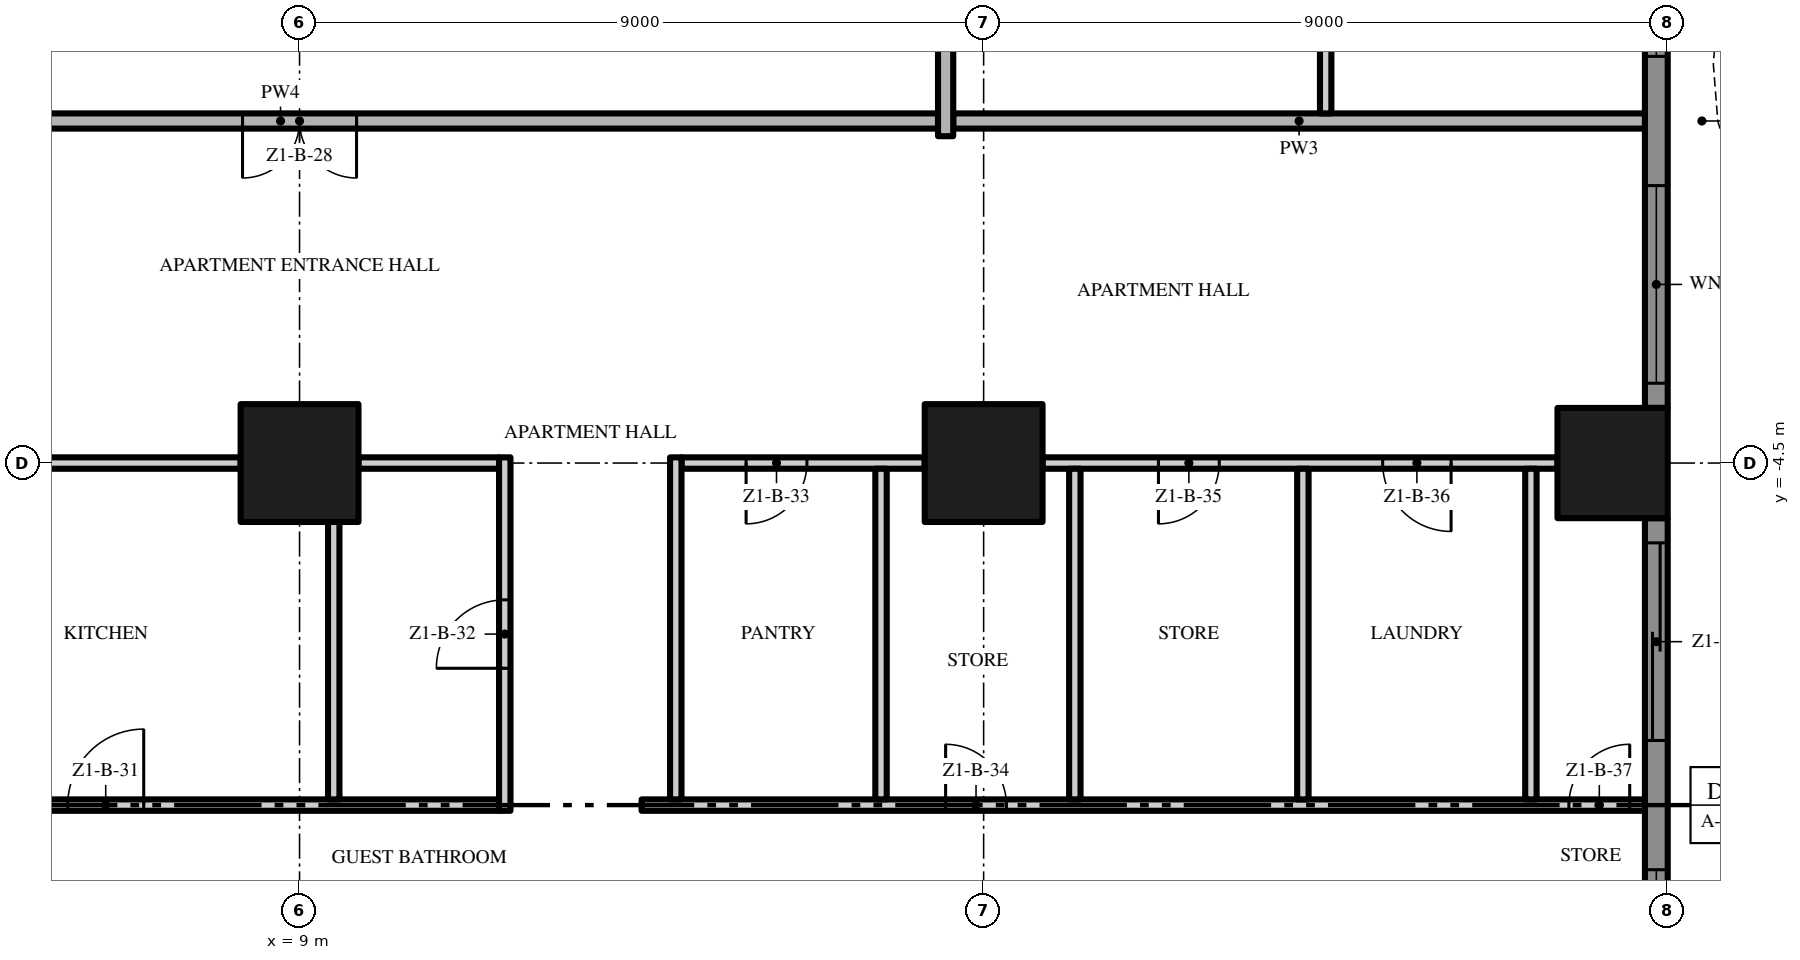
"""IFC4 building model, lengths in metres.
Left out: names, types, materials, properties, quantities, classifications, styles, units other than length and angle.
Written with IfcOpenShell. Run it as: python <this file> out.ifc"""

import sys

from ifc_helpers import new_model, si_unit, direction, frame, frame_2d, origin, origin_2d, place, context, subcontext, project, spatial, polyline, rectangle, outline, extrude, element, fill, save


model = new_model("IFC4")
c1 = context("Model", 3, precision=1e-05, world=origin(), true_north=direction((0.0, 1.0)))
c2 = subcontext(c1, "Body", "Model", "MODEL_VIEW")
j1 = project(units=[si_unit("LENGTHUNIT", "METRE"), si_unit("PLANEANGLEUNIT", "RADIAN")], contexts=[c1])
p1 = place(None, origin())
s1 = spatial("IfcSite", under=j1, at=p1, CompositionType="ELEMENT")
p2 = place(p1, origin())
s2 = spatial("IfcBuilding", under=s1, at=p2, CompositionType="ELEMENT")
p3 = place(p2, frame((0.0, 0.0, 30.2)))
s3 = spatial("IfcBuildingStorey", under=s2, at=p3, CompositionType="ELEMENT", Elevation=30.2)
p4 = place(p3, frame((18.0, -4.5, 0.0), z_axis=(0.0, 0.0, 1.0), x_axis=(1.0, 0.0, 0.0)))
e1 = element("IfcColumn", 1, at=p4, inside=s3, PredefinedType="COLUMN", context=c2, shape_type="SweptSolid", body=[
    extrude(rectangle(XDim=1.55, YDim=1.55, at=origin_2d()), origin(), (0.0, 0.0, 1.0), 3.5),
])
p5 = place(p3, frame((26.275, -4.5, 0.0), z_axis=(0.0, 0.0, 1.0), x_axis=(1.0, 0.0, 0.0)))
e2 = element("IfcColumn", 2, at=p5, inside=s3, PredefinedType="COLUMN", context=c2, shape_type="SweptSolid", body=[
    extrude(rectangle(XDim=1.45, YDim=1.45, at=origin_2d()), origin(), (0.0, 0.0, 1.0), 3.5),
])
p6 = place(p3, frame((9.0, -4.5, 0.0), z_axis=(0.0, 0.0, 1.0), x_axis=(1.0, 0.0, 0.0)))
e3 = element("IfcColumn", 3, at=p6, inside=s3, PredefinedType="COLUMN", context=c2, shape_type="SweptSolid", body=[
    extrude(rectangle(XDim=1.55, YDim=1.55, at=origin_2d()), origin(), (0.0, 0.0, 1.0), 3.5),
])
p7 = place(p3, frame((26.85, -5.225, 0.0), z_axis=(0.0, 0.0, 1.0), x_axis=(0.0, -1.0, 0.0)))
e4 = element("IfcWall", 4, at=p7, inside=s3, PredefinedType="SOLIDWALL", context=c2, shape_type="SweptSolid", body=[
    extrude(rectangle(XDim=7.55, YDim=0.3, at=frame_2d((3.775, 0.0))), origin(), (0.0, 0.0, 1.0), 3.5),
])
p8 = place(p7, frame((4.625, 0.0, 0.45)))
e5 = element("IfcOpeningElement", 5, at=p8, cuts=e4, PredefinedType="OPENING", context=c2, shape_type="SweptSolid", body=[
    extrude(rectangle(XDim=2.6, YDim=2.65, at=frame_2d((1.3, 1.325))), frame((0.0, 0.16, 0.0), z_axis=(0.0, -1.0, 0.0), x_axis=(1.0, 0.0, 0.0)), (0.0, 0.0, 1.0), 0.32),
])
p9 = place(p7, frame((0.325, 0.0, 0.0)))
e6 = element("IfcOpeningElement", 6, at=p9, cuts=e4, PredefinedType="OPENING", context=c2, shape_type="SweptSolid", body=[
    extrude(rectangle(XDim=2.6, YDim=2.4, at=frame_2d((1.3, 1.2))), frame((0.0, 0.16, 0.0), z_axis=(0.0, -1.0, 0.0), x_axis=(1.0, 0.0, 0.0)), (0.0, 0.0, 1.0), 0.32),
])
p10 = place(p3, frame((26.85, 3.775, 0.0), z_axis=(0.0, 0.0, 1.0), x_axis=(0.0, -1.0, 0.0)))
e7 = element("IfcWall", 7, at=p10, inside=s3, PredefinedType="SOLIDWALL", context=c2, shape_type="SweptSolid", body=[
    extrude(rectangle(XDim=7.55, YDim=0.3, at=frame_2d((3.775, 0.0))), origin(), (0.0, 0.0, 1.0), 3.5),
])
p11 = place(p10, frame((4.625, 0.0, 0.45)))
e8 = element("IfcOpeningElement", 8, at=p11, cuts=e7, PredefinedType="OPENING", context=c2, shape_type="SweptSolid", body=[
    extrude(rectangle(XDim=2.6, YDim=2.65, at=frame_2d((1.3, 1.325))), frame((0.0, 0.16, 0.0), z_axis=(0.0, -1.0, 0.0), x_axis=(1.0, 0.0, 0.0)), (0.0, 0.0, 1.0), 0.32),
])
p12 = place(p10, frame((0.325, 0.0, 0.45)))
e9 = element("IfcOpeningElement", 9, at=p12, cuts=e7, PredefinedType="OPENING", context=c2, shape_type="SweptSolid", body=[
    extrude(rectangle(XDim=2.6, YDim=2.65, at=frame_2d((1.3, 1.325))), frame((0.0, 0.16, 0.0), z_axis=(0.0, -1.0, 0.0), x_axis=(1.0, 0.0, 0.0)), (0.0, 0.0, 1.0), 0.32),
])
p13 = place(p3, origin())
e10 = element("IfcWall", 10, at=p13, inside=s3, PredefinedType="USERDEFINED", context=c2, shape_type="SweptSolid", body=[
    extrude(outline(polyline([(28.8, -18.0), (28.095, -16.5), (27.659, -15.0), (27.6, -14.25), (27.659, -13.5), (28.095, -12.0), (28.8, -10.5), (29.505, -9.0), (29.941, -7.5), (30.0, -6.75), (29.941, -6.0), (29.505, -4.5), (28.8, -3.0), (28.095, -1.5), (27.659, 0.0), (27.6, 0.75), (27.659, 1.5), (28.095, 3.0), (28.8, 4.5), (29.505, 6.0), (29.941, 7.5), (30.0, 8.25), (29.941, 9.0), (29.505, 10.5), (28.8, 12.0), (28.095, 13.5), (27.659, 15.0), (27.6, 15.75), (27.659, 16.5), (28.095, 18.0), (27.855, 18.07), (27.411, 16.545), (27.349, 15.75), (27.411, 14.955), (27.86, 13.411), (28.574, 11.894), (29.271, 10.411), (29.694, 8.955), (29.749, 8.25), (29.694, 7.545), (29.271, 6.089), (28.574, 4.606), (27.86, 3.089), (27.411, 1.545), (27.349, 0.75), (27.411, -0.045), (27.86, -1.589), (28.574, -3.106), (29.271, -4.589), (29.694, -6.045), (29.749, -6.75), (29.694, -7.455), (29.271, -8.911), (28.574, -10.394), (27.86, -11.911), (27.411, -13.455), (27.349, -14.25), (27.411, -15.045), (27.86, -16.589), (28.574, -18.106), (28.8, -18.0)])), origin(), (0.0, 0.0, 1.0), 0.9),
])
p14 = place(p3, frame((0.1, -9.0, 0.0), z_axis=(0.0, 0.0, 1.0), x_axis=(1.0, 0.0, 0.0)))
e11 = element("IfcWall", 11, at=p14, inside=s3, PredefinedType="PARTITIONING", context=c2, shape_type="SweptSolid", body=[
    extrude(rectangle(XDim=11.525, YDim=0.15, at=frame_2d((5.763, 0.0))), origin(), (0.0, 0.0, 1.0), 3.5),
])
p15 = place(p14, frame((0.4, 0.0, 0.0)))
e12 = element("IfcOpeningElement", 12, at=p15, cuts=e11, PredefinedType="OPENING", context=c2, shape_type="SweptSolid", body=[
    extrude(rectangle(XDim=0.8, YDim=2.0, at=frame_2d((0.4, 1.0))), frame((0.0, 0.085, 0.0), z_axis=(0.0, -1.0, 0.0), x_axis=(1.0, 0.0, 0.0)), (0.0, 0.0, 1.0), 0.17),
])
p16 = place(p14, frame((5.85, 0.0, 0.0)))
e13 = element("IfcOpeningElement", 13, at=p16, cuts=e11, PredefinedType="OPENING", context=c2, shape_type="SweptSolid", body=[
    extrude(rectangle(XDim=1.0, YDim=2.4, at=frame_2d((0.5, 1.2))), frame((0.0, 0.085, 0.0), z_axis=(0.0, -1.0, 0.0), x_axis=(1.0, 0.0, 0.0)), (0.0, 0.0, 1.0), 0.17),
])
p17 = place(p3, frame((13.5, -9.0, 0.0), z_axis=(0.0, 0.0, 1.0), x_axis=(1.0, 0.0, 0.0)))
e14 = element("IfcWall", 14, at=p17, inside=s3, PredefinedType="PARTITIONING", context=c2, shape_type="SweptSolid", body=[
    extrude(rectangle(XDim=13.2, YDim=0.15, at=frame_2d((6.6, 0.0))), origin(), (0.0, 0.0, 1.0), 3.5),
])
p18 = place(p17, frame((4.0, 0.0, 0.0)))
e15 = element("IfcOpeningElement", 15, at=p18, cuts=e14, PredefinedType="OPENING", context=c2, shape_type="SweptSolid", body=[
    extrude(rectangle(XDim=0.8, YDim=2.0, at=frame_2d((0.4, 1.0))), frame((0.0, 0.085, 0.0), z_axis=(0.0, -1.0, 0.0), x_axis=(1.0, 0.0, 0.0)), (0.0, 0.0, 1.0), 0.17),
])
p19 = place(p17, frame((12.2, 0.0, 0.0)))
e16 = element("IfcOpeningElement", 16, at=p19, cuts=e14, PredefinedType="OPENING", context=c2, shape_type="SweptSolid", body=[
    extrude(rectangle(XDim=0.8, YDim=2.0, at=frame_2d((0.4, 1.0))), frame((0.0, 0.085, 0.0), z_axis=(0.0, -1.0, 0.0), x_axis=(1.0, 0.0, 0.0)), (0.0, 0.0, 1.0), 0.17),
])
p20 = place(p3, frame((8.225, -4.5, 0.0), z_axis=(0.0, 0.0, 1.0), x_axis=(-1.0, 0.0, 0.0)))
e17 = element("IfcWall", 17, at=p20, inside=s3, PredefinedType="PARTITIONING", context=c2, shape_type="SweptSolid", body=[
    extrude(rectangle(XDim=7.45, YDim=0.15, at=frame_2d((3.725, 0.0))), origin(), (0.0, 0.0, 1.0), 3.5),
])
p21 = place(p20, frame((5.225, 0.0, 0.0)))
e18 = element("IfcOpeningElement", 18, at=p21, cuts=e17, PredefinedType="OPENING", context=c2, shape_type="SweptSolid", body=[
    extrude(rectangle(XDim=0.8, YDim=2.0, at=frame_2d((0.4, 1.0))), frame((0.0, 0.085, 0.0), z_axis=(0.0, -1.0, 0.0), x_axis=(1.0, 0.0, 0.0)), (0.0, 0.0, 1.0), 0.17),
])
p22 = place(p3, frame((9.775, -4.5, 0.0), z_axis=(0.0, 0.0, 1.0), x_axis=(1.0, 0.0, 0.0)))
e19 = element("IfcWall", 19, at=p22, inside=s3, PredefinedType="PARTITIONING", context=c2, shape_type="SweptSolid", body=[
    extrude(rectangle(XDim=1.85, YDim=0.15, at=frame_2d((0.925, 0.0))), origin(), (0.0, 0.0, 1.0), 3.5),
])
p23 = place(p3, frame((17.225, -4.5, 0.0), z_axis=(0.0, 0.0, 1.0), x_axis=(-1.0, 0.0, 0.0)))
e20 = element("IfcWall", 20, at=p23, inside=s3, PredefinedType="PARTITIONING", context=c2, shape_type="SweptSolid", body=[
    extrude(rectangle(XDim=3.2, YDim=0.15, at=frame_2d((1.6, 0.0))), origin(), (0.0, 0.0, 1.0), 3.5),
])
p24 = place(p23, frame((1.55, 0.0, 0.0)))
e21 = element("IfcOpeningElement", 21, at=p24, cuts=e20, PredefinedType="OPENING", context=c2, shape_type="SweptSolid", body=[
    extrude(rectangle(XDim=0.8, YDim=2.0, at=frame_2d((0.4, 1.0))), frame((0.0, 0.085, 0.0), z_axis=(0.0, -1.0, 0.0), x_axis=(1.0, 0.0, 0.0)), (0.0, 0.0, 1.0), 0.17),
])
p25 = place(p3, frame((25.55, -4.5, 0.0), z_axis=(0.0, 0.0, 1.0), x_axis=(-1.0, 0.0, 0.0)))
e22 = element("IfcWall", 22, at=p25, inside=s3, PredefinedType="PARTITIONING", context=c2, shape_type="SweptSolid", body=[
    extrude(rectangle(XDim=6.775, YDim=0.15, at=frame_2d((3.388, 0.0))), origin(), (0.0, 0.0, 1.0), 3.5),
])
p26 = place(p25, frame((4.45, 0.0, 0.0)))
e23 = element("IfcOpeningElement", 23, at=p26, cuts=e22, PredefinedType="OPENING", context=c2, shape_type="SweptSolid", body=[
    extrude(rectangle(XDim=0.8, YDim=2.0, at=frame_2d((0.4, 1.0))), frame((0.0, 0.085, 0.0), z_axis=(0.0, -1.0, 0.0), x_axis=(1.0, 0.0, 0.0)), (0.0, 0.0, 1.0), 0.17),
])
p27 = place(p25, frame((1.4, 0.0, 0.0)))
e24 = element("IfcOpeningElement", 24, at=p27, cuts=e22, PredefinedType="OPENING", context=c2, shape_type="SweptSolid", body=[
    extrude(rectangle(XDim=0.9, YDim=2.1, at=frame_2d((0.45, 1.05))), frame((0.0, 0.085, 0.0), z_axis=(0.0, -1.0, 0.0), x_axis=(1.0, 0.0, 0.0)), (0.0, 0.0, 1.0), 0.17),
])
p28 = place(p3, frame((17.4, 0.0, 0.0), z_axis=(0.0, 0.0, 1.0), x_axis=(-1.0, 0.0, 0.0)))
e25 = element("IfcWall", 25, at=p28, inside=s3, PredefinedType="PARTITIONING", context=c2, shape_type="SweptSolid", body=[
    extrude(rectangle(XDim=17.3, YDim=0.2, at=frame_2d((8.65, 0.0))), origin(), (0.0, 0.0, 1.0), 3.5),
])
p29 = place(p28, frame((7.65, 0.0, 0.0)))
e26 = element("IfcOpeningElement", 26, at=p29, cuts=e25, PredefinedType="OPENING", context=c2, shape_type="SweptSolid", body=[
    extrude(rectangle(XDim=1.5, YDim=2.4, at=frame_2d((0.75, 1.2))), frame((0.0, 0.11, 0.0), z_axis=(0.0, -1.0, 0.0), x_axis=(1.0, 0.0, 0.0)), (0.0, 0.0, 1.0), 0.22),
])
p30 = place(p3, frame((17.6, 0.0, 0.0), z_axis=(0.0, 0.0, 1.0), x_axis=(1.0, 0.0, 0.0)))
e27 = element("IfcWall", 27, at=p30, inside=s3, PredefinedType="PARTITIONING", context=c2, shape_type="SweptSolid", body=[
    extrude(rectangle(XDim=9.1, YDim=0.2, at=frame_2d((4.55, 0.0))), origin(), (0.0, 0.0, 1.0), 3.5),
])
p31 = place(p3, frame((9.45, -8.925, 0.0), z_axis=(0.0, 0.0, 1.0), x_axis=(0.0, 1.0, 0.0)))
e28 = element("IfcWall", 28, at=p31, inside=s3, PredefinedType="PARTITIONING", context=c2, shape_type="SweptSolid", body=[
    extrude(rectangle(XDim=3.65, YDim=0.15, at=frame_2d((1.825, 0.0))), origin(), (0.0, 0.0, 1.0), 3.5),
])
p32 = place(p3, frame((11.7, -9.075, 0.0), z_axis=(0.0, 0.0, 1.0), x_axis=(0.0, 1.0, 0.0)))
e29 = element("IfcWall", 29, at=p32, inside=s3, PredefinedType="PARTITIONING", context=c2, shape_type="SweptSolid", body=[
    extrude(rectangle(XDim=4.65, YDim=0.15, at=frame_2d((2.325, 0.0))), origin(), (0.0, 0.0, 1.0), 3.5),
])
p33 = place(p32, frame((1.875, 0.0, 0.0)))
e30 = element("IfcOpeningElement", 30, at=p33, cuts=e29, PredefinedType="OPENING", context=c2, shape_type="SweptSolid", body=[
    extrude(rectangle(XDim=0.9, YDim=2.1, at=frame_2d((0.45, 1.05))), frame((0.0, 0.085, 0.0), z_axis=(0.0, -1.0, 0.0), x_axis=(1.0, 0.0, 0.0)), (0.0, 0.0, 1.0), 0.17),
])
p34 = place(p3, frame((13.95, -8.925, 0.0), z_axis=(0.0, 0.0, 1.0), x_axis=(0.0, 1.0, 0.0)))
e31 = element("IfcWall", 31, at=p34, inside=s3, PredefinedType="PARTITIONING", context=c2, shape_type="SweptSolid", body=[
    extrude(rectangle(XDim=4.5, YDim=0.15, at=frame_2d((2.25, 0.0))), origin(), (0.0, 0.0, 1.0), 3.5),
])
p35 = place(p3, frame((16.65, -8.925, 0.0), z_axis=(0.0, 0.0, 1.0), x_axis=(0.0, 1.0, 0.0)))
e32 = element("IfcWall", 32, at=p35, inside=s3, PredefinedType="PARTITIONING", context=c2, shape_type="SweptSolid", body=[
    extrude(rectangle(XDim=4.35, YDim=0.15, at=frame_2d((2.175, 0.0))), origin(), (0.0, 0.0, 1.0), 3.5),
])
p36 = place(p3, frame((17.5, -0.2, 0.0), z_axis=(0.0, 0.0, 1.0), x_axis=(0.0, 1.0, 0.0)))
e33 = element("IfcWall", 33, at=p36, inside=s3, PredefinedType="PARTITIONING", context=c2, shape_type="SweptSolid", body=[
    extrude(rectangle(XDim=3.925, YDim=0.2, at=frame_2d((1.962, 0.0))), origin(), (0.0, 0.0, 1.0), 3.5),
])
for number, where, z_axis, x_axis in (
    (34, (19.2, -8.925, 0.0), (0.0, 0.0, 1.0), (0.0, 1.0, 0.0)),
    (35, (22.2, -8.925, 0.0), (0.0, 0.0, 1.0), (0.0, 1.0, 0.0)),
):
    element("IfcWall", number, at=place(p3, frame(where, z_axis=z_axis, x_axis=x_axis)), inside=s3, PredefinedType="PARTITIONING", context=c2, shape_type="SweptSolid", body=[
        extrude(rectangle(XDim=4.35, YDim=0.15, at=frame_2d((2.175, 0.0))), origin(), (0.0, 0.0, 1.0), 3.5),
    ])
p37 = place(p3, frame((22.5, 17.275, 0.0), z_axis=(0.0, 0.0, 1.0), x_axis=(0.0, -1.0, 0.0)))
e36 = element("IfcWall", 36, at=p37, inside=s3, PredefinedType="PARTITIONING", context=c2, shape_type="SweptSolid", body=[
    extrude(rectangle(XDim=17.175, YDim=0.15, at=frame_2d((8.588, 0.0))), origin(), (0.0, 0.0, 1.0), 3.5),
])
p38 = place(p37, frame((14.525, 0.0, 0.0)))
e37 = element("IfcOpeningElement", 37, at=p38, cuts=e36, PredefinedType="OPENING", context=c2, shape_type="SweptSolid", body=[
    extrude(rectangle(XDim=1.0, YDim=2.4, at=frame_2d((0.5, 1.2))), frame((0.0, 0.085, 0.0), z_axis=(0.0, -1.0, 0.0), x_axis=(1.0, 0.0, 0.0)), (0.0, 0.0, 1.0), 0.17),
])
p39 = place(p37, frame((8.925, 0.0, 0.0)))
e38 = element("IfcOpeningElement", 38, at=p39, cuts=e36, PredefinedType="OPENING", context=c2, shape_type="SweptSolid", body=[
    extrude(rectangle(XDim=1.0, YDim=2.4, at=frame_2d((0.5, 1.2))), frame((0.0, 0.085, 0.0), z_axis=(0.0, -1.0, 0.0), x_axis=(1.0, 0.0, 0.0)), (0.0, 0.0, 1.0), 0.17),
])
p40 = place(p37, frame((3.975, 0.0, 0.0)))
e39 = element("IfcOpeningElement", 39, at=p40, cuts=e36, PredefinedType="OPENING", context=c2, shape_type="SweptSolid", body=[
    extrude(rectangle(XDim=1.8, YDim=2.4, at=frame_2d((0.9, 1.2))), frame((0.0, 0.085, 0.0), z_axis=(0.0, -1.0, 0.0), x_axis=(1.0, 0.0, 0.0)), (0.0, 0.0, 1.0), 0.17),
])
p41 = place(p3, frame((25.2, -8.925, 0.0), z_axis=(0.0, 0.0, 1.0), x_axis=(0.0, 1.0, 0.0)))
e40 = element("IfcWall", 40, at=p41, inside=s3, PredefinedType="PARTITIONING", context=c2, shape_type="SweptSolid", body=[
    extrude(rectangle(XDim=4.35, YDim=0.15, at=frame_2d((2.175, 0.0))), origin(), (0.0, 0.0, 1.0), 3.5),
])
p42 = place(p8, origin())
e41 = element("IfcWindow", 41, at=p42, inside=s3, PartitioningType="SINGLE_PANEL", PredefinedType="WINDOW", context=c2, shape_type="SweptSolid", body=[
    extrude(rectangle(XDim=2.6, YDim=2.65, at=frame_2d((1.3, 1.325))), frame((0.0, 0.03, 0.0), z_axis=(0.0, -1.0, 0.0), x_axis=(1.0, 0.0, 0.0)), (0.0, 0.0, 1.0), 0.06),
])
fill(e5, e41)
p43 = place(p9, origin())
e42 = element("IfcDoor", 42, at=p43, inside=s3, OperationType="SINGLE_SWING_LEFT", PredefinedType="DOOR", context=c2, shape_type="SweptSolid", body=[
    extrude(rectangle(XDim=2.6, YDim=2.4, at=frame_2d((1.3, 1.2))), frame((0.0, 0.025, 0.0), z_axis=(0.0, -1.0, 0.0), x_axis=(1.0, 0.0, 0.0)), (0.0, 0.0, 1.0), 0.05),
])
fill(e6, e42)
p44 = place(p11, origin())
e43 = element("IfcWindow", 43, at=p44, inside=s3, PartitioningType="SINGLE_PANEL", PredefinedType="WINDOW", context=c2, shape_type="SweptSolid", body=[
    extrude(rectangle(XDim=2.6, YDim=2.65, at=frame_2d((1.3, 1.325))), frame((0.0, 0.03, 0.0), z_axis=(0.0, -1.0, 0.0), x_axis=(1.0, 0.0, 0.0)), (0.0, 0.0, 1.0), 0.06),
])
fill(e8, e43)
p45 = place(p12, origin())
e44 = element("IfcWindow", 44, at=p45, inside=s3, PartitioningType="SINGLE_PANEL", PredefinedType="WINDOW", context=c2, shape_type="SweptSolid", body=[
    extrude(rectangle(XDim=2.6, YDim=2.65, at=frame_2d((1.3, 1.325))), frame((0.0, 0.03, 0.0), z_axis=(0.0, -1.0, 0.0), x_axis=(1.0, 0.0, 0.0)), (0.0, 0.0, 1.0), 0.06),
])
fill(e9, e44)
p46 = place(p29, origin())
e45 = element("IfcDoor", 45, at=p46, inside=s3, OperationType="DOUBLE_DOOR_SINGLE_SWING", PredefinedType="DOOR", context=c2, shape_type="SweptSolid", body=[
    extrude(rectangle(XDim=1.5, YDim=2.4, at=frame_2d((0.75, 1.2))), frame((0.0, 0.025, 0.0), z_axis=(0.0, -1.0, 0.0), x_axis=(1.0, 0.0, 0.0)), (0.0, 0.0, 1.0), 0.05),
])
fill(e26, e45)
p47 = place(p16, origin())
e46 = element("IfcDoor", 46, at=p47, inside=s3, OperationType="SINGLE_SWING_RIGHT", PredefinedType="DOOR", context=c2, shape_type="SweptSolid", body=[
    extrude(rectangle(XDim=1.0, YDim=2.4, at=frame_2d((0.5, 1.2))), frame((0.0, 0.025, 0.0), z_axis=(0.0, -1.0, 0.0), x_axis=(1.0, 0.0, 0.0)), (0.0, 0.0, 1.0), 0.05),
])
fill(e13, e46)
p48 = place(p33, origin())
e47 = element("IfcDoor", 47, at=p48, inside=s3, OperationType="SINGLE_SWING_LEFT", PredefinedType="DOOR", context=c2, shape_type="SweptSolid", body=[
    extrude(rectangle(XDim=0.9, YDim=2.1, at=frame_2d((0.45, 1.05))), frame((0.0, 0.025, 0.0), z_axis=(0.0, -1.0, 0.0), x_axis=(1.0, 0.0, 0.0)), (0.0, 0.0, 1.0), 0.05),
])
fill(e30, e47)
p49 = place(p24, origin())
e48 = element("IfcDoor", 48, at=p49, inside=s3, OperationType="SINGLE_SWING_RIGHT", PredefinedType="DOOR", context=c2, shape_type="SweptSolid", body=[
    extrude(rectangle(XDim=0.8, YDim=2.0, at=frame_2d((0.4, 1.0))), frame((0.0, 0.025, 0.0), z_axis=(0.0, -1.0, 0.0), x_axis=(1.0, 0.0, 0.0)), (0.0, 0.0, 1.0), 0.05),
])
fill(e21, e48)
p50 = place(p18, origin())
e49 = element("IfcDoor", 49, at=p50, inside=s3, OperationType="SINGLE_SWING_LEFT", PredefinedType="DOOR", context=c2, shape_type="SweptSolid", body=[
    extrude(rectangle(XDim=0.8, YDim=2.0, at=frame_2d((0.4, 1.0))), frame((0.0, 0.025, 0.0), z_axis=(0.0, -1.0, 0.0), x_axis=(1.0, 0.0, 0.0)), (0.0, 0.0, 1.0), 0.05),
])
fill(e15, e49)
p51 = place(p26, origin())
e50 = element("IfcDoor", 50, at=p51, inside=s3, OperationType="SINGLE_SWING_RIGHT", PredefinedType="DOOR", context=c2, shape_type="SweptSolid", body=[
    extrude(rectangle(XDim=0.8, YDim=2.0, at=frame_2d((0.4, 1.0))), frame((0.0, 0.025, 0.0), z_axis=(0.0, -1.0, 0.0), x_axis=(1.0, 0.0, 0.0)), (0.0, 0.0, 1.0), 0.05),
])
fill(e23, e50)
p52 = place(p27, origin())
e51 = element("IfcDoor", 51, at=p52, inside=s3, OperationType="SINGLE_SWING_LEFT", PredefinedType="DOOR", context=c2, shape_type="SweptSolid", body=[
    extrude(rectangle(XDim=0.9, YDim=2.1, at=frame_2d((0.45, 1.05))), frame((0.0, 0.025, 0.0), z_axis=(0.0, -1.0, 0.0), x_axis=(1.0, 0.0, 0.0)), (0.0, 0.0, 1.0), 0.05),
])
fill(e24, e51)
p53 = place(p19, origin())
e52 = element("IfcDoor", 52, at=p53, inside=s3, OperationType="SINGLE_SWING_RIGHT", PredefinedType="DOOR", context=c2, shape_type="SweptSolid", body=[
    extrude(rectangle(XDim=0.8, YDim=2.0, at=frame_2d((0.4, 1.0))), frame((0.0, 0.025, 0.0), z_axis=(0.0, -1.0, 0.0), x_axis=(1.0, 0.0, 0.0)), (0.0, 0.0, 1.0), 0.05),
])
fill(e16, e52)
save(model, sys.argv[1])
